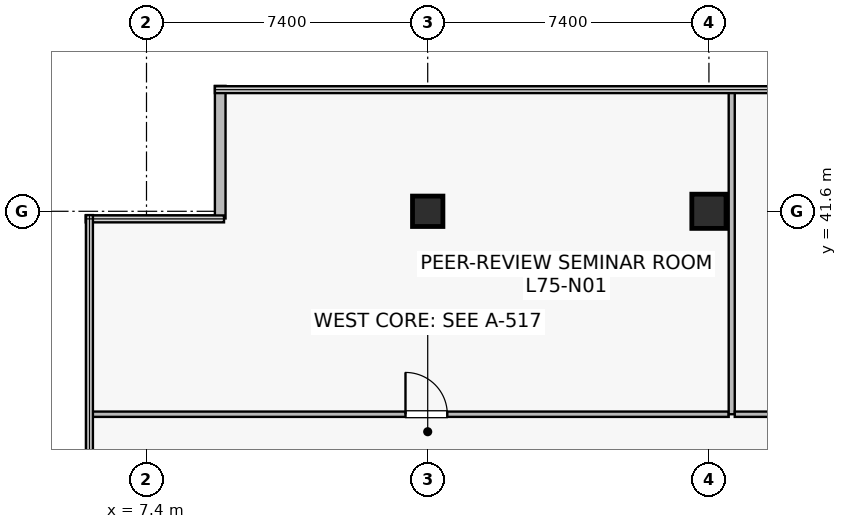
"""IFC4 building model, lengths in metres.
Left out: names, types, materials, properties, quantities, classifications, styles, units other than length and angle.
Written with IfcOpenShell. Run it as: python <this file> out.ifc"""

import sys

from ifc_helpers import new_model, si_unit, direction, frame, frame_2d, origin, origin_2d, place, context, subcontext, project, spatial, rectangle, extrude, source, transform, mapped, element, fill, save


model = new_model("IFC4")
c1 = context("Model", 3, precision=1e-05, world=origin(), true_north=direction((0.0, 1.0)))
c2 = subcontext(c1, "Body", "Model", "MODEL_VIEW")
j1 = project(units=[si_unit("LENGTHUNIT", "METRE"), si_unit("PLANEANGLEUNIT", "RADIAN")], contexts=[c1])
p1 = place(None, origin())
s1 = spatial("IfcSite", under=j1, at=p1, CompositionType="ELEMENT")
p2 = place(p1, origin())
s2 = spatial("IfcBuilding", under=s1, at=p2, CompositionType="ELEMENT")
p3 = place(p2, frame((0.0, 0.0, 314.4)))
s3 = spatial("IfcBuildingStorey", under=s2, at=p3, CompositionType="ELEMENT", Elevation=314.4)
m1 = source(origin(), c2, "Body", "SweptSolid", [
    extrude(rectangle(XDim=0.8, YDim=0.8, at=origin_2d()), origin(), (0.0, 0.0, 1.0), 4.2),
])
p4 = place(p3, frame((14.8, 41.6, 0.0), z_axis=(0.0, 0.0, 1.0), x_axis=(1.0, 0.0, 0.0)))
e1 = element("IfcColumn", 1, at=p4, inside=s3, PredefinedType="COLUMN", context=c2, shape_type="MappedRepresentation", body=[
    mapped(m1, transform((0.0, 0.0, 0.0), scale=1.0)),
])
m2 = source(origin(), c2, "Body", "SweptSolid", [
    extrude(rectangle(XDim=0.9, YDim=0.9, at=origin_2d()), origin(), (0.0, 0.0, 1.0), 4.2),
])
p5 = place(p3, frame((22.2, 41.6, 0.0), z_axis=(0.0, 0.0, 1.0), x_axis=(1.0, 0.0, 0.0)))
e2 = element("IfcColumn", 2, at=p5, inside=s3, PredefinedType="COLUMN", context=c2, shape_type="MappedRepresentation", body=[
    mapped(m2, transform((0.0, 0.0, 0.0), scale=1.0)),
])
p6 = place(p3, frame((9.34, 44.9, 0.0), z_axis=(0.0, 0.0, 1.0), x_axis=(0.0, -1.0, 0.0)))
e3 = element("IfcWall", 3, at=p6, inside=s3, PredefinedType="STANDARD", context=c2, shape_type="SweptSolid", body=[
    extrude(rectangle(XDim=3.488, YDim=0.28, at=frame_2d((1.744, 0.0))), origin(), (0.0, 0.0, 1.0), 3.9),
])
p7 = place(p3, frame((5.91, 36.26, 0.0), z_axis=(0.0, 0.0, 1.0), x_axis=(1.0, 0.0, 0.0)))
e4 = element("IfcWall", 4, at=p7, inside=s3, PredefinedType="PARTITIONING", context=c2, shape_type="SweptSolid", body=[
    extrude(rectangle(XDim=16.81, YDim=0.14, at=frame_2d((8.405, 0.0))), origin(), (0.0, 0.0, 1.0), 3.297),
])
p8 = place(p7, frame((8.305, 0.0, 0.0)))
e5 = element("IfcOpeningElement", 5, at=p8, cuts=e4, PredefinedType="OPENING", context=c2, shape_type="SweptSolid", body=[
    extrude(rectangle(XDim=1.1, YDim=2.18, at=frame_2d((0.55, 1.09))), frame((0.0, 0.08, 0.0), z_axis=(0.0, -1.0, 0.0), x_axis=(1.0, 0.0, 0.0)), (0.0, 0.0, 1.0), 0.16),
])
p9 = place(p3, frame((22.8, 36.26, 0.0), z_axis=(0.0, 0.0, 1.0), x_axis=(0.0, 1.0, 0.0)))
e6 = element("IfcWall", 6, at=p9, inside=s3, PredefinedType="PARTITIONING", context=c2, shape_type="SweptSolid", body=[
    extrude(rectangle(XDim=8.53, YDim=0.16, at=frame_2d((4.265, 0.0))), origin(), (0.0, 0.0, 1.0), 2.985),
])
p10 = place(p3, frame((22.88, 36.26, 0.0), z_axis=(0.0, 0.0, 1.0), x_axis=(1.0, 0.0, 0.0)))
e7 = element("IfcWall", 7, at=p10, inside=s3, PredefinedType="PARTITIONING", context=c2, shape_type="SweptSolid", body=[
    extrude(rectangle(XDim=22.84, YDim=0.14, at=frame_2d((11.42, 0.0))), origin(), (0.0, 0.0, 1.0), 3.297),
])
p11 = place(p10, frame((8.976, 0.0, 0.0)))
e8 = element("IfcOpeningElement", 8, at=p11, cuts=e7, PredefinedType="OPENING", context=c2, shape_type="SweptSolid", body=[
    extrude(rectangle(XDim=1.1, YDim=2.18, at=frame_2d((0.55, 1.09))), frame((0.0, 0.08, 0.0), z_axis=(0.0, -1.0, 0.0), x_axis=(1.0, 0.0, 0.0)), (0.0, 0.0, 1.0), 0.16),
])
m3 = source(origin(), c2, "Body", "SweptSolid", [
    extrude(rectangle(XDim=1.1, YDim=2.18, at=frame_2d((0.55, 1.09))), frame((0.0, 0.025, 0.0), z_axis=(0.0, -1.0, 0.0), x_axis=(1.0, 0.0, 0.0)), (0.0, 0.0, 1.0), 0.05),
])
p12 = place(p8, origin())
e9 = element("IfcDoor", 9, at=p12, inside=s3, OperationType="SINGLE_SWING_LEFT", PredefinedType="DOOR", context=c2, shape_type="MappedRepresentation", body=[
    mapped(m3, transform((0.0, 0.0, 0.0), scale=1.0)),
])
fill(e5, e9)
save(model, sys.argv[1])
